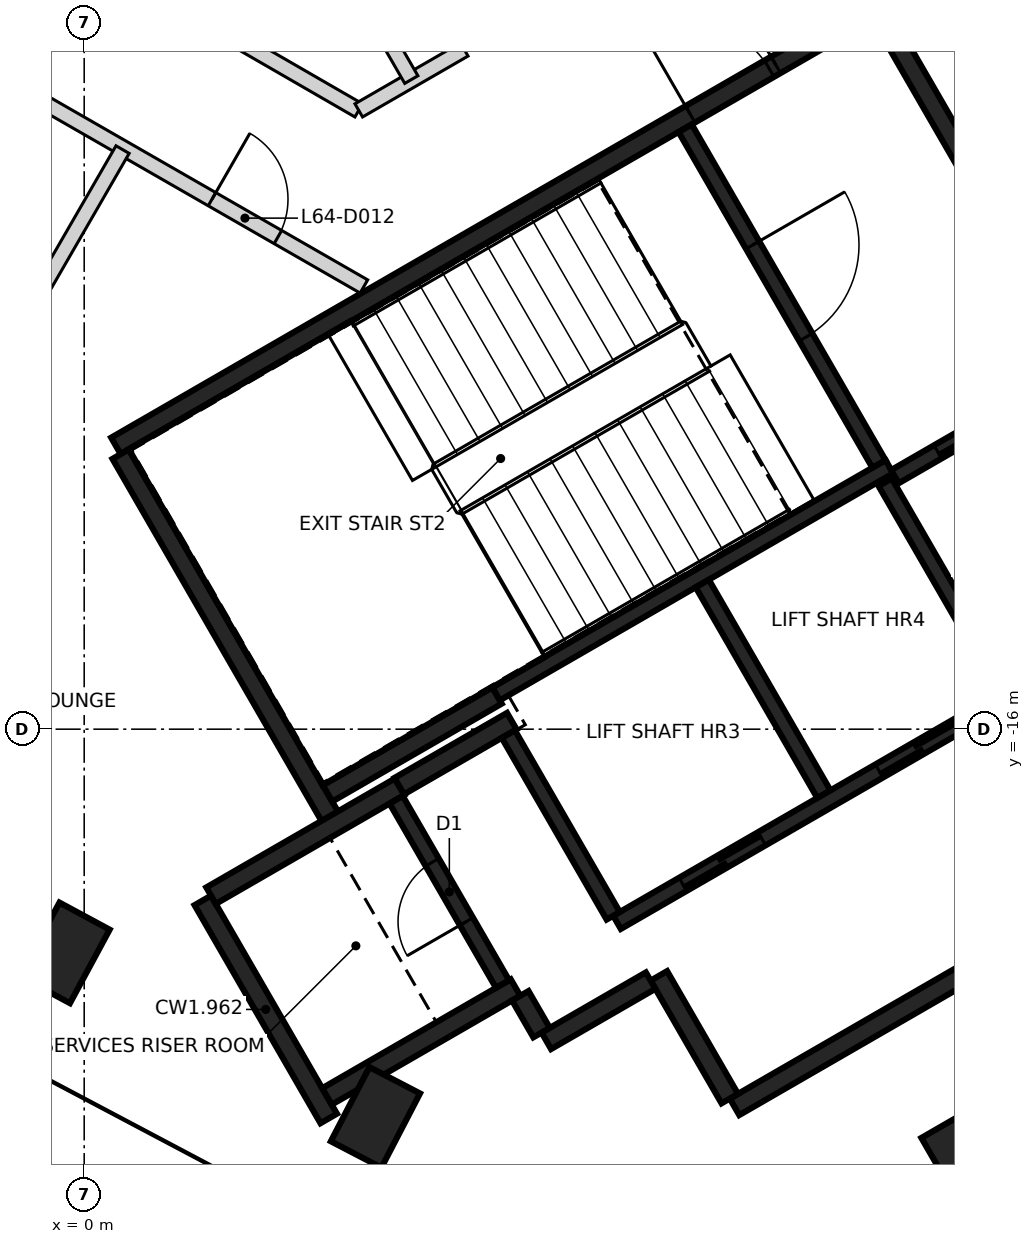
"""IFC4 building model, lengths in metres.
Left out: names, types, materials, properties, quantities, classifications, styles, units other than length and angle.
Written with IfcOpenShell. Run it as: python <this file> out.ifc"""

import sys

from ifc_helpers import new_model, si_unit, direction, frame, frame_2d, origin, origin_2d, place, context, subcontext, project, spatial, rectangle, extrude, element, fill, save


model = new_model("IFC4")
c1 = context("Model", 3, precision=1e-05, world=origin(), true_north=direction((0.0, 1.0)))
c2 = subcontext(c1, "Body", "Model", "MODEL_VIEW")
j1 = project(units=[si_unit("LENGTHUNIT", "METRE"), si_unit("PLANEANGLEUNIT", "RADIAN")], contexts=[c1])
p1 = place(None, origin())
s1 = spatial("IfcSite", under=j1, at=p1, CompositionType="ELEMENT")
p2 = place(p1, origin())
s2 = spatial("IfcBuilding", under=s1, at=p2, CompositionType="ELEMENT")
p3 = place(p2, frame((0.0, 0.0, 253.8)))
s3 = spatial("IfcBuildingStorey", under=s2, at=p3, CompositionType="ELEMENT", Elevation=253.8)
for number, where, z_axis, x_axis in (
    (1, (-0.256, -18.943, -0.35), (0.0, 0.0, 1.0), (0.475, 0.88, 0.0)),
    (2, (3.832, -21.107, -0.35), (0.0, 0.0, 1.0), (0.461, 0.887, 0.0)),
):
    element("IfcColumn", number, at=place(p3, frame(where, z_axis=z_axis, x_axis=x_axis)), inside=s3, PredefinedType="COLUMN", context=c2, shape_type="SweptSolid", body=[
        extrude(rectangle(XDim=1.1, YDim=0.75, at=origin_2d()), origin(), (0.0, 0.0, 1.0), 2.64),
    ])
p4 = place(p3, frame((12.71, -22.015, -0.35), z_axis=(0.0, 0.0, 1.0), x_axis=(-0.5, 0.866025403784, 0.0)))
e3 = element("IfcColumn", 3, at=p4, inside=s3, PredefinedType="COLUMN", context=c2, shape_type="SweptSolid", body=[
    extrude(rectangle(XDim=2.8, YDim=2.3, at=origin_2d()), origin(), (0.0, 0.0, 1.0), 3.55),
])
p5 = place(p3, frame((0.417, -12.273, 0.0), z_axis=(0.0, 0.0, 1.0), x_axis=(0.866021906294, 0.500006057782, 0.0)))
e4 = element("IfcWall", 4, at=p5, inside=s3, PredefinedType="SHEAR", context=c2, shape_type="SweptSolid", body=[
    extrude(rectangle(XDim=11.55, YDim=0.25, at=frame_2d((5.775, 0.0))), origin(), (0.0, 0.0, 1.0), 3.2),
])
p6 = place(p5, frame((10.025, 0.0, 0.0)))
e5 = element("IfcOpeningElement", 5, at=p6, cuts=e4, PredefinedType="OPENING", context=c2, shape_type="SweptSolid", body=[
    extrude(rectangle(XDim=1.2, YDim=2.1, at=frame_2d((0.6, 1.05))), frame((0.0, 0.135, 0.0), z_axis=(0.0, -1.0, 0.0), x_axis=(1.0, 0.0, 0.0)), (0.0, 0.0, 1.0), 0.27),
])
p7 = place(p5, frame((8.725, 0.0, 0.0)))
e6 = element("IfcOpeningElement", 6, at=p7, cuts=e4, PredefinedType="OPENING", context=c2, shape_type="SweptSolid", body=[
    extrude(rectangle(XDim=1.2, YDim=2.1, at=frame_2d((0.6, 1.05))), frame((0.0, 0.135, 0.0), z_axis=(0.0, -1.0, 0.0), x_axis=(1.0, 0.0, 0.0)), (0.0, 0.0, 1.0), 0.27),
])
p8 = place(p3, frame((16.133, -16.594, 0.0), z_axis=(0.0, 0.0, 1.0), x_axis=(-0.866022959057, -0.500004234368, 0.0)))
e7 = element("IfcWall", 7, at=p8, inside=s3, PredefinedType="SHEAR", context=c2, shape_type="SweptSolid", body=[
    extrude(rectangle(XDim=8.75, YDim=0.25, at=frame_2d((4.375, 0.0))), origin(), (0.0, 0.0, 1.0), 3.2),
])
p9 = place(p3, frame((3.235, -17.153, 0.0), z_axis=(0.0, 0.0, 1.0), x_axis=(-0.500008851346, 0.866020293397, 0.0)))
e8 = element("IfcWall", 8, at=p9, inside=s3, PredefinedType="SHEAR", context=c2, shape_type="SweptSolid", body=[
    extrude(rectangle(XDim=5.51, YDim=0.25, at=frame_2d((2.755, 0.0))), origin(), (0.0, 0.0, 1.0), 3.2),
])
p10 = place(p3, frame((10.483, -6.606, 0.0), z_axis=(0.0, 0.0, 1.0), x_axis=(0.49999885962, -0.866026062182, 0.0)))
e9 = element("IfcWall", 9, at=p10, inside=s3, PredefinedType="SHEAR", context=c2, shape_type="SweptSolid", body=[
    extrude(rectangle(XDim=5.225, YDim=0.25, at=frame_2d((2.612, 0.0))), origin(), (0.0, 0.0, 1.0), 3.2),
])
p11 = place(p3, frame((3.217, -21.122, 0.0), z_axis=(0.0, 0.0, 1.0), x_axis=(-0.499998874531, 0.866026053573, 0.0)))
e10 = element("IfcWall", 10, at=p11, inside=s3, PredefinedType="SHEAR", context=c2, shape_type="SweptSolid", body=[
    extrude(rectangle(XDim=3.313, YDim=0.25, at=frame_2d((1.656, 0.0))), origin(), (0.0, 0.0, 1.0), 3.2),
])
p12 = place(p3, frame((1.669, -18.19, 0.0), z_axis=(0.0, 0.0, 1.0), x_axis=(0.866042235819, 0.499970844928, 0.0)))
e11 = element("IfcWall", 11, at=p12, inside=s3, PredefinedType="SHEAR", context=c2, shape_type="SweptSolid", body=[
    extrude(rectangle(XDim=2.865, YDim=0.25, at=frame_2d((1.432, 0.0))), origin(), (0.0, 0.0, 1.0), 3.2),
])
p13 = place(p3, frame((5.675, -19.399, 0.0), z_axis=(0.0, 0.0, 1.0), x_axis=(-0.866026637627, -0.499997862916, 0.0)))
e12 = element("IfcWall", 12, at=p13, inside=s3, PredefinedType="SHEAR", context=c2, shape_type="SweptSolid", body=[
    extrude(rectangle(XDim=2.865, YDim=0.25, at=frame_2d((1.432, 0.0))), origin(), (0.0, 0.0, 1.0), 3.2),
])
p14 = place(p3, frame((5.431, -15.556, 0.0), z_axis=(0.0, 0.0, 1.0), x_axis=(-0.866022940537, -0.500004266446, 0.0)))
e13 = element("IfcWall", 13, at=p14, inside=s3, PredefinedType="SHEAR", context=c2, shape_type="SweptSolid", body=[
    extrude(rectangle(XDim=2.575, YDim=0.25, at=frame_2d((1.287, 0.0))), origin(), (0.0, 0.0, 1.0), 3.2),
])
p15 = place(p3, frame((8.493, -20.86, 0.0), z_axis=(0.0, 0.0, 1.0), x_axis=(-0.500039802285, 0.866002422705, 0.0)))
e14 = element("IfcWall", 14, at=p15, inside=s3, PredefinedType="SHEAR", context=c2, shape_type="SweptSolid", body=[
    extrude(rectangle(XDim=1.865, YDim=0.25, at=frame_2d((0.932, 0.0))), origin(), (0.0, 0.0, 1.0), 3.2),
])
p16 = place(p3, frame((4.145, -16.749, 0.0), z_axis=(0.0, 0.0, 1.0), x_axis=(0.866038183914, 0.499977863513, 0.0)))
e15 = element("IfcWall", 15, at=p16, inside=s3, PredefinedType="SHEAR", context=c2, shape_type="SweptSolid", body=[
    extrude(rectangle(XDim=1.71, YDim=0.25, at=frame_2d((0.855, 0.0))), origin(), (0.0, 0.0, 1.0), 3.2),
])
p17 = place(p3, frame((7.452, -19.308, 0.0), z_axis=(0.0, 0.0, 1.0), x_axis=(-0.866044474677, -0.49996696679, 0.0)))
e16 = element("IfcWall", 16, at=p17, inside=s3, PredefinedType="SHEAR", context=c2, shape_type="SweptSolid", body=[
    extrude(rectangle(XDim=1.584, YDim=0.25, at=frame_2d((0.792, 0.0))), origin(), (0.0, 0.0, 1.0), 3.2),
])
p18 = place(p3, frame((6.017, -19.992, 0.0), z_axis=(0.0, 0.0, 1.0), x_axis=(-0.500364886717, 0.865814633822, 0.0)))
e17 = element("IfcWall", 17, at=p18, inside=s3, PredefinedType="SHEAR", context=c2, shape_type="SweptSolid", body=[
    extrude(rectangle(XDim=0.559, YDim=0.25, at=frame_2d((0.28, 0.0))), origin(), (0.0, 0.0, 1.0), 3.2),
])
p19 = place(p3, frame((5.419, -15.534, 0.0), z_axis=(0.0, 0.0, 1.0), x_axis=(0.866029065029, 0.499993658486, 0.0)))
e18 = element("IfcWall", 18, at=p19, inside=s3, PredefinedType="SHEAR", context=c2, shape_type="SweptSolid", body=[
    extrude(rectangle(XDim=5.974, YDim=0.2, at=frame_2d((2.987, 0.0))), origin(), (0.0, 0.0, 1.0), 3.2),
])
p20 = place(p3, frame((7.01, -18.542, 0.0), z_axis=(0.0, 0.0, 1.0), x_axis=(0.866030299012, 0.499991521122, 0.0)))
e19 = element("IfcWall", 19, at=p20, inside=s3, PredefinedType="SHEAR", context=c2, shape_type="SweptSolid", body=[
    extrude(rectangle(XDim=6.1, YDim=0.2, at=frame_2d((3.05, 0.0))), origin(), (0.0, 0.0, 1.0), 3.2),
])
p21 = place(p20, frame((1.0, 0.0, 0.0)))
e20 = element("IfcOpeningElement", 20, at=p21, cuts=e19, PredefinedType="OPENING", context=c2, shape_type="SweptSolid", body=[
    extrude(rectangle(XDim=1.2, YDim=2.1, at=frame_2d((0.6, 1.05))), frame((0.0, 0.11, 0.0), z_axis=(0.0, -1.0, 0.0), x_axis=(1.0, 0.0, 0.0)), (0.0, 0.0, 1.0), 0.22),
])
p22 = place(p20, frame((3.982, 0.0, 0.0)))
e21 = element("IfcOpeningElement", 21, at=p22, cuts=e19, PredefinedType="OPENING", context=c2, shape_type="SweptSolid", body=[
    extrude(rectangle(XDim=1.2, YDim=2.1, at=frame_2d((0.6, 1.05))), frame((0.0, 0.11, 0.0), z_axis=(0.0, -1.0, 0.0), x_axis=(1.0, 0.0, 0.0)), (0.0, 0.0, 1.0), 0.22),
])
p23 = place(p3, frame((7.906, -8.094, 0.0), z_axis=(0.0, 0.0, 1.0), x_axis=(0.500027839223, -0.866009330205, 0.0)))
e22 = element("IfcWall", 22, at=p23, inside=s3, PredefinedType="SHEAR", context=c2, shape_type="SweptSolid", body=[
    extrude(rectangle(XDim=5.098, YDim=0.2, at=frame_2d((2.549, 0.0))), origin(), (0.0, 0.0, 1.0), 3.2),
])
p24 = place(p23, frame((1.774, 0.0, 0.0)))
e23 = element("IfcOpeningElement", 23, at=p24, cuts=e22, PredefinedType="OPENING", context=c2, shape_type="SweptSolid", body=[
    extrude(rectangle(XDim=1.4, YDim=2.1, at=frame_2d((0.7, 1.05))), frame((0.0, 0.11, 0.0), z_axis=(0.0, -1.0, 0.0), x_axis=(1.0, 0.0, 0.0)), (0.0, 0.0, 1.0), 0.22),
])
p25 = place(p3, frame((8.132, -14.084, 0.0), z_axis=(0.0, 0.0, 1.0), x_axis=(0.499997778408, -0.866026686418, 0.0)))
e24 = element("IfcWall", 24, at=p25, inside=s3, PredefinedType="SHEAR", context=c2, shape_type="SweptSolid", body=[
    extrude(rectangle(XDim=3.198, YDim=0.2, at=frame_2d((1.599, 0.0))), origin(), (0.0, 0.0, 1.0), 3.2),
])
p26 = place(p3, frame((5.503, -19.352, 0.0), z_axis=(0.0, 0.0, 1.0), x_axis=(-0.499986818241, 0.866033014143, 0.0)))
e25 = element("IfcWall", 25, at=p26, inside=s3, PredefinedType="SHEAR", context=c2, shape_type="SweptSolid", body=[
    extrude(rectangle(XDim=2.798, YDim=0.2, at=frame_2d((1.399, 0.0))), origin(), (0.0, 0.0, 1.0), 3.2),
])
p27 = place(p26, frame((0.949, 0.0, 0.0)))
e26 = element("IfcOpeningElement", 26, at=p27, cuts=e25, PredefinedType="OPENING", context=c2, shape_type="SweptSolid", body=[
    extrude(rectangle(XDim=0.9, YDim=2.1, at=frame_2d((0.45, 1.05))), frame((0.0, 0.11, 0.0), z_axis=(0.0, -1.0, 0.0), x_axis=(1.0, 0.0, 0.0)), (0.0, 0.0, 1.0), 0.22),
])
p28 = place(p3, frame((6.96, -18.455, 0.0), z_axis=(0.0, 0.0, 1.0), x_axis=(-0.499926705758, 0.866067716099, 0.0)))
e27 = element("IfcWall", 27, at=p28, inside=s3, PredefinedType="SHEAR", context=c2, shape_type="SweptSolid", body=[
    extrude(rectangle(XDim=2.759, YDim=0.2, at=frame_2d((1.38, 0.0))), origin(), (0.0, 0.0, 1.0), 3.2),
])
p29 = place(p3, frame((12.088, -15.437, 0.0), z_axis=(0.0, 0.0, 1.0), x_axis=(-0.500026960575, 0.86600983753, 0.0)))
e28 = element("IfcWall", 28, at=p29, inside=s3, PredefinedType="SHEAR", context=c2, shape_type="SweptSolid", body=[
    extrude(rectangle(XDim=3.1, YDim=0.2, at=frame_2d((1.55, 0.0))), origin(), (0.0, 0.0, 1.0), 3.2),
])
p30 = place(p3, frame((10.666, -12.678, 0.0), z_axis=(0.0, 0.0, 1.0), x_axis=(0.866018407898, 0.500012117035, 0.0)))
e29 = element("IfcWall", 29, at=p30, inside=s3, PredefinedType="SHEAR", context=c2, shape_type="SweptSolid", body=[
    extrude(rectangle(XDim=2.651, YDim=0.2, at=frame_2d((1.325, 0.0))), origin(), (0.0, 0.0, 1.0), 3.2),
])
p31 = place(p30, frame((0.652, 0.0, 0.0)))
e30 = element("IfcOpeningElement", 30, at=p31, cuts=e29, PredefinedType="OPENING", context=c2, shape_type="SweptSolid", body=[
    extrude(rectangle(XDim=1.3, YDim=2.1, at=frame_2d((0.65, 1.05))), frame((0.0, 0.11, 0.0), z_axis=(0.0, -1.0, 0.0), x_axis=(1.0, 0.0, 0.0)), (0.0, 0.0, 1.0), 0.22),
])
p32 = place(p3, frame((-8.612, -0.801, 0.0), z_axis=(0.0, 0.0, 1.0), x_axis=(0.865998070783, -0.50004733916, 0.0)))
e31 = element("IfcWall", 31, at=p32, inside=s3, PredefinedType="PARTITIONING", context=c2, shape_type="SweptSolid", body=[
    extrude(rectangle(XDim=14.115, YDim=0.2, at=frame_2d((7.058, 0.0))), origin(), (0.0, 0.0, 1.0), 3.2),
])
p33 = place(p32, frame((3.085, 0.0, 0.0)))
e32 = element("IfcOpeningElement", 32, at=p33, cuts=e31, PredefinedType="OPENING", context=c2, shape_type="SweptSolid", body=[
    extrude(rectangle(XDim=0.9, YDim=2.1, at=frame_2d((0.45, 1.05))), frame((0.0, 0.11, 0.0), z_axis=(0.0, -1.0, 0.0), x_axis=(1.0, 0.0, 0.0)), (0.0, 0.0, 1.0), 0.22),
])
p34 = place(p32, frame((10.131, 0.0, 0.0)))
e33 = element("IfcOpeningElement", 33, at=p34, cuts=e31, PredefinedType="OPENING", context=c2, shape_type="SweptSolid", body=[
    extrude(rectangle(XDim=0.9, YDim=2.1, at=frame_2d((0.45, 1.05))), frame((0.0, 0.11, 0.0), z_axis=(0.0, -1.0, 0.0), x_axis=(1.0, 0.0, 0.0)), (0.0, 0.0, 1.0), 0.22),
])
p35 = place(p3, frame((-7.589, -3.702, 0.0), z_axis=(0.0, 0.0, 1.0), x_axis=(0.867107959402, -0.498120253293, 0.0)))
e34 = element("IfcWall", 34, at=p35, inside=s3, PredefinedType="PARTITIONING", context=c2, shape_type="SweptSolid", body=[
    extrude(rectangle(XDim=12.996, YDim=0.2, at=frame_2d((6.498, 0.0))), origin(), (0.0, 0.0, 1.0), 3.2),
])
p36 = place(p35, frame((4.536, 0.0, 0.0)))
e35 = element("IfcOpeningElement", 35, at=p36, cuts=e34, PredefinedType="OPENING", context=c2, shape_type="SweptSolid", body=[
    extrude(rectangle(XDim=0.95, YDim=2.1, at=frame_2d((0.475, 1.05))), frame((0.0, 0.11, 0.0), z_axis=(0.0, -1.0, 0.0), x_axis=(1.0, 0.0, 0.0)), (0.0, 0.0, 1.0), 0.22),
])
p37 = place(p35, frame((10.691, 0.0, 0.0)))
e36 = element("IfcOpeningElement", 36, at=p37, cuts=e34, PredefinedType="OPENING", context=c2, shape_type="SweptSolid", body=[
    extrude(rectangle(XDim=1.0, YDim=2.1, at=frame_2d((0.5, 1.05))), frame((0.0, 0.11, 0.0), z_axis=(0.0, -1.0, 0.0), x_axis=(1.0, 0.0, 0.0)), (0.0, 0.0, 1.0), 0.22),
])
p38 = place(p3, frame((3.612, -7.859, 0.0), z_axis=(0.0, 0.0, 1.0), x_axis=(0.866002901518, 0.500038973044, 0.0)))
e37 = element("IfcWall", 37, at=p38, inside=s3, PredefinedType="PARTITIONING", context=c2, shape_type="SweptSolid", body=[
    extrude(rectangle(XDim=1.602, YDim=0.2, at=frame_2d((0.801, 0.0))), origin(), (0.0, 0.0, 1.0), 3.2),
])
p39 = place(p3, frame((11.216, -5.06, 0.0), z_axis=(0.0, 0.0, 1.0), x_axis=(0.514001858113, -0.857789070726, 0.0)))
e38 = element("IfcWall", 38, at=p39, inside=s3, PredefinedType="PARTITIONING", context=c2, shape_type="SweptSolid", body=[
    extrude(rectangle(XDim=9.161, YDim=0.2, at=frame_2d((4.581, 0.0))), origin(), (0.0, 0.0, 1.0), 3.2),
])
p40 = place(p39, frame((4.437, 0.0, 0.0)))
e39 = element("IfcOpeningElement", 39, at=p40, cuts=e38, PredefinedType="OPENING", context=c2, shape_type="SweptSolid", body=[
    extrude(rectangle(XDim=0.95, YDim=2.1, at=frame_2d((0.475, 1.05))), frame((0.0, 0.11, 0.0), z_axis=(0.0, -1.0, 0.0), x_axis=(1.0, 0.0, 0.0)), (0.0, 0.0, 1.0), 0.22),
])
p41 = place(p3, frame((-5.097, -18.078, 0.0), z_axis=(0.0, 0.0, 1.0), x_axis=(0.49996389635, 0.866046247233, 0.0)))
e40 = element("IfcWall", 40, at=p41, inside=s3, PredefinedType="PARTITIONING", context=c2, shape_type="SweptSolid", body=[
    extrude(rectangle(XDim=11.204, YDim=0.2, at=frame_2d((5.602, 0.0))), origin(), (0.0, 0.0, 1.0), 3.2),
])
p42 = place(p3, frame((3.0, -5.196, 0.0), z_axis=(0.0, 0.0, 1.0), x_axis=(0.500076354988, -0.865981315724, 0.0)))
e41 = element("IfcWall", 41, at=p42, inside=s3, PredefinedType="PARTITIONING", context=c2, shape_type="SweptSolid", body=[
    extrude(rectangle(XDim=2.607, YDim=0.2, at=frame_2d((1.304, 0.0))), origin(), (0.0, 0.0, 1.0), 3.2),
])
p43 = place(p31, origin())
e42 = element("IfcDoor", 42, at=p43, inside=s3, OperationType="SLIDING_TO_RIGHT", PredefinedType="DOOR", context=c2, shape_type="SweptSolid", body=[
    extrude(rectangle(XDim=1.3, YDim=2.1, at=frame_2d((0.65, 1.05))), frame((0.0, 0.025, 0.0), z_axis=(0.0, -1.0, 0.0), x_axis=(1.0, 0.0, 0.0)), (0.0, 0.0, 1.0), 0.05),
])
fill(e30, e42)
p44 = place(p21, origin())
e43 = element("IfcDoor", 43, at=p44, inside=s3, OperationType="DOUBLE_DOOR_SLIDING", PredefinedType="DOOR", context=c2, shape_type="SweptSolid", body=[
    extrude(rectangle(XDim=1.2, YDim=2.1, at=frame_2d((0.6, 1.05))), frame((0.0, 0.025, 0.0), z_axis=(0.0, -1.0, 0.0), x_axis=(1.0, 0.0, 0.0)), (0.0, 0.0, 1.0), 0.05),
])
fill(e20, e43)
p45 = place(p22, origin())
e44 = element("IfcDoor", 44, at=p45, inside=s3, OperationType="DOUBLE_DOOR_SLIDING", PredefinedType="DOOR", context=c2, shape_type="SweptSolid", body=[
    extrude(rectangle(XDim=1.2, YDim=2.1, at=frame_2d((0.6, 1.05))), frame((0.0, 0.025, 0.0), z_axis=(0.0, -1.0, 0.0), x_axis=(1.0, 0.0, 0.0)), (0.0, 0.0, 1.0), 0.05),
])
fill(e21, e44)
p46 = place(p6, origin())
e45 = element("IfcDoor", 45, at=p46, inside=s3, OperationType="SINGLE_SWING_LEFT", PredefinedType="DOOR", context=c2, shape_type="SweptSolid", body=[
    extrude(rectangle(XDim=1.2, YDim=2.1, at=frame_2d((0.6, 1.05))), frame((0.0, 0.025, 0.0), z_axis=(0.0, -1.0, 0.0), x_axis=(1.0, 0.0, 0.0)), (0.0, 0.0, 1.0), 0.05),
])
fill(e5, e45)
p47 = place(p7, origin())
e46 = element("IfcDoor", 46, at=p47, inside=s3, OperationType="SINGLE_SWING_RIGHT", PredefinedType="DOOR", context=c2, shape_type="SweptSolid", body=[
    extrude(rectangle(XDim=1.2, YDim=2.1, at=frame_2d((0.6, 1.05))), frame((0.0, 0.025, 0.0), z_axis=(0.0, -1.0, 0.0), x_axis=(1.0, 0.0, 0.0)), (0.0, 0.0, 1.0), 0.05),
])
fill(e6, e46)
p48 = place(p24, origin())
e47 = element("IfcDoor", 47, at=p48, inside=s3, OperationType="SINGLE_SWING_RIGHT", PredefinedType="DOOR", context=c2, shape_type="SweptSolid", body=[
    extrude(rectangle(XDim=1.4, YDim=2.1, at=frame_2d((0.7, 1.05))), frame((0.0, 0.025, 0.0), z_axis=(0.0, -1.0, 0.0), x_axis=(1.0, 0.0, 0.0)), (0.0, 0.0, 1.0), 0.05),
])
fill(e23, e47)
p49 = place(p27, origin())
e48 = element("IfcDoor", 48, at=p49, inside=s3, OperationType="SINGLE_SWING_LEFT", PredefinedType="DOOR", context=c2, shape_type="SweptSolid", body=[
    extrude(rectangle(XDim=0.9, YDim=2.1, at=frame_2d((0.45, 1.05))), frame((0.0, 0.025, 0.0), z_axis=(0.0, -1.0, 0.0), x_axis=(1.0, 0.0, 0.0)), (0.0, 0.0, 1.0), 0.05),
])
fill(e26, e48)
p50 = place(p37, frame((1.0, 0.0, 0.0), z_axis=(0.0, 0.0, 1.0), x_axis=(-1.0, 0.0, 0.0)))
e49 = element("IfcDoor", 49, at=p50, inside=s3, OperationType="SINGLE_SWING_LEFT", PredefinedType="DOOR", context=c2, shape_type="SweptSolid", body=[
    extrude(rectangle(XDim=1.0, YDim=2.1, at=frame_2d((0.5, 1.05))), frame((0.0, 0.025, 0.0), z_axis=(0.0, -1.0, 0.0), x_axis=(1.0, 0.0, 0.0)), (0.0, 0.0, 1.0), 0.05),
])
fill(e36, e49)
save(model, sys.argv[1])
